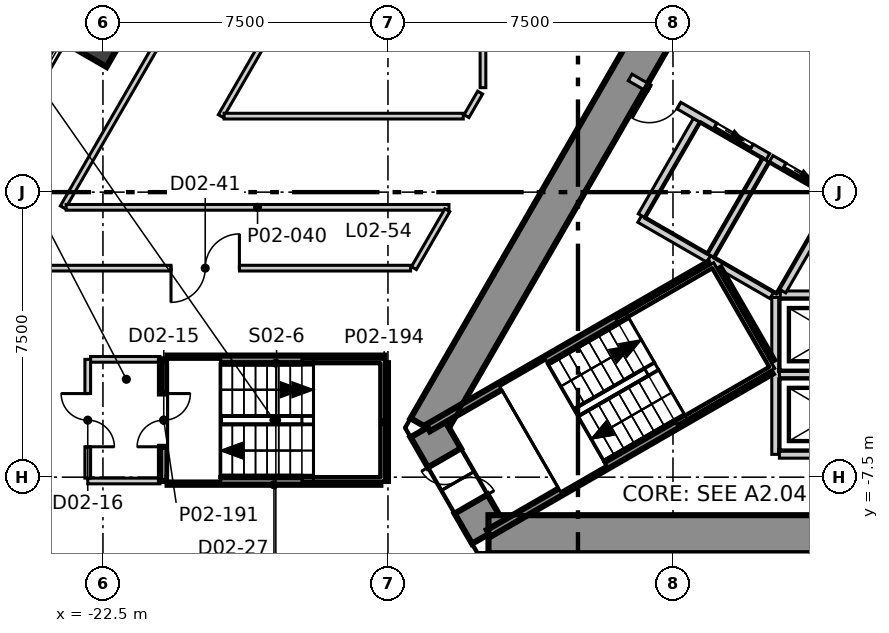
"""IFC4 building model, lengths in metres.
Left out: names, types, materials, properties, quantities, classifications, styles, units other than length and angle.
Written with IfcOpenShell. Run it as: python <this file> out.ifc"""

import sys

from ifc_helpers import new_model, si_unit, direction, frame, frame_2d, origin, origin_2d, place, context, subcontext, project, spatial, polyline, rectangle, outline, extrude, element, fill, save


model = new_model("IFC4")
c1 = context("Model", 3, precision=1e-05, world=origin(), true_north=direction((0.0, 1.0)))
c2 = subcontext(c1, "Body", "Model", "MODEL_VIEW")
j1 = project(units=[si_unit("LENGTHUNIT", "METRE"), si_unit("PLANEANGLEUNIT", "RADIAN")], contexts=[c1])
p1 = place(None, origin())
s1 = spatial("IfcSite", under=j1, at=p1, CompositionType="ELEMENT")
p2 = place(p1, origin())
s2 = spatial("IfcBuilding", under=s1, at=p2, CompositionType="ELEMENT")
p3 = place(p2, frame((0.0, 0.0, 14.5)))
s3 = spatial("IfcBuildingStorey", under=s2, at=p3, CompositionType="ELEMENT", Elevation=14.5)
p4 = place(p3, frame((-1.617, 15.2, -0.4), z_axis=(0.0, 0.0, 1.0), x_axis=(-0.499992141631, -0.866029940768, 0.0)))
e1 = element("IfcWall", 1, at=p4, inside=s3, PredefinedType="SHEAR", context=c2, shape_type="SweptSolid", body=[
    extrude(outline(polyline([(-0.289, -0.499), (1.656, -0.499), (3.601, -0.499), (5.547, -0.499), (7.492, -0.499), (9.437, -0.5), (11.382, -0.5), (13.328, -0.5), (15.273, -0.5), (17.218, -0.5), (19.163, -0.5), (21.109, -0.5), (23.054, -0.5), (24.999, -0.5), (24.422, 0.5), (22.566, 0.5), (20.709, 0.5), (18.853, 0.5), (16.997, 0.5), (15.14, 0.5), (13.284, 0.5), (11.427, 0.5), (9.571, 0.5), (7.715, 0.5), (5.858, 0.5), (4.002, 0.5), (2.146, 0.5), (0.289, 0.5), (-0.289, -0.499)])), origin(), (0.0, 0.0, 1.0), 5.4),
])
p5 = place(p4, frame((11.805, 0.0, 0.4)))
e2 = element("IfcOpeningElement", 2, at=p5, cuts=e1, PredefinedType="OPENING", context=c2, shape_type="SweptSolid", body=[
    extrude(rectangle(XDim=1.1, YDim=2.1, at=frame_2d((0.55, 1.05))), frame((0.0, 0.51, 0.0), z_axis=(0.0, -1.0, 0.0), x_axis=(1.0, 0.0, 0.0)), (0.0, 0.0, 1.0), 1.02),
])
p6 = place(p3, frame((-13.972, -6.2, -0.4), z_axis=(0.0, 0.0, 1.0), x_axis=(0.500077567175, -0.865980615723, 0.0)))
e3 = element("IfcWall", 3, at=p6, inside=s3, PredefinedType="SHEAR", context=c2, shape_type="SweptSolid", body=[
    extrude(outline(polyline([(-0.289, -0.5), (1.616, -0.5), (3.522, -0.5), (2.944, 0.499), (1.617, 0.5), (0.289, 0.5), (-0.289, -0.5)])), origin(), (0.0, 0.0, 1.0), 5.4),
])
p7 = place(p6, frame((0.917, 0.0, 0.4)))
e4 = element("IfcOpeningElement", 4, at=p7, cuts=e3, PredefinedType="OPENING", context=c2, shape_type="SweptSolid", body=[
    extrude(rectangle(XDim=1.4, YDim=2.1, at=frame_2d((0.7, 1.05))), frame((0.0, 0.51, 0.0), z_axis=(0.0, -1.0, 0.0), x_axis=(1.0, 0.0, 0.0)), (0.0, 0.0, 1.0), 1.02),
])
p8 = place(p3, frame((-12.355, -9.0, -0.4), z_axis=(0.0, 0.0, 1.0), x_axis=(1.0, 0.0, 0.0)))
e5 = element("IfcWall", 5, at=p8, inside=s3, PredefinedType="SHEAR", context=c2, shape_type="SweptSolid", body=[
    extrude(outline(polyline([(-0.289, -0.5), (1.656, -0.5), (3.601, -0.5), (5.547, -0.5), (7.492, -0.5), (9.437, -0.5), (11.382, -0.5), (13.328, -0.5), (15.273, -0.5), (17.218, -0.5), (19.163, -0.5), (21.109, -0.5), (23.054, -0.5), (24.999, -0.5), (24.422, 0.5), (22.566, 0.5), (20.709, 0.5), (18.853, 0.5), (16.996, 0.5), (15.14, 0.5), (13.283, 0.5), (11.427, 0.5), (9.57, 0.5), (7.714, 0.5), (5.857, 0.5), (4.001, 0.5), (2.145, 0.5), (0.288, 0.5), (-0.289, -0.5)])), origin(), (0.0, 0.0, 1.0), 5.4),
])
p9 = place(p3, frame((-22.506, 4.219, -0.4), z_axis=(0.0, 0.0, 1.0), x_axis=(0.5, 0.866025403784, 0.0)))
e6 = element("IfcColumn", 6, at=p9, inside=s3, PredefinedType="COLUMN", context=c2, shape_type="SweptSolid", body=[
    extrude(rectangle(XDim=1.5, YDim=1.1, at=origin_2d()), origin(), (0.0, 0.0, 1.0), 5.4),
])
p10 = place(p3, frame((-22.9, -7.6, 0.0), z_axis=(0.0, 0.0, 1.0), x_axis=(1.0, 0.0, 0.0)))
e7 = element("IfcWall", 7, at=p10, inside=s3, PredefinedType="PARTITIONING", context=c2, shape_type="SweptSolid", body=[
    extrude(rectangle(XDim=1.9, YDim=0.15, at=frame_2d((0.95, 0.0))), origin(), (0.0, 0.0, 1.0), 5.0),
])
p11 = place(p3, frame((-22.9, -7.525, 0.0), z_axis=(0.0, 0.0, 1.0), x_axis=(0.0, 1.0, 0.0)))
e8 = element("IfcWall", 8, at=p11, inside=s3, PredefinedType="PARTITIONING", context=c2, shape_type="SweptSolid", body=[
    extrude(rectangle(XDim=3.125, YDim=0.15, at=frame_2d((1.562, 0.0))), origin(), (0.0, 0.0, 1.0), 5.0),
])
p12 = place(p11, frame((0.825, 0.0, 0.0)))
e9 = element("IfcOpeningElement", 9, at=p12, cuts=e8, PredefinedType="OPENING", context=c2, shape_type="SweptSolid", body=[
    extrude(rectangle(XDim=1.4, YDim=2.1, at=frame_2d((0.7, 1.05))), frame((0.0, 0.085, 0.0), z_axis=(0.0, -1.0, 0.0), x_axis=(1.0, 0.0, 0.0)), (0.0, 0.0, 1.0), 0.17),
])
p13 = place(p3, frame((-22.825, -4.4, 0.0), z_axis=(0.0, 0.0, 1.0), x_axis=(1.0, 0.0, 0.0)))
e10 = element("IfcWall", 10, at=p13, inside=s3, PredefinedType="PARTITIONING", context=c2, shape_type="SweptSolid", body=[
    extrude(rectangle(XDim=1.825, YDim=0.15, at=frame_2d((0.913, 0.0))), origin(), (0.0, 0.0, 1.0), 5.0),
])
p14 = place(p3, frame((-23.556, -0.4, 0.0), z_axis=(0.0, 0.0, 1.0), x_axis=(0.500011000363, 0.866019052629, 0.0)))
e11 = element("IfcWall", 11, at=p14, inside=s3, PredefinedType="PARTITIONING", context=c2, shape_type="SweptSolid", body=[
    extrude(rectangle(XDim=17.089, YDim=0.15, at=frame_2d((8.545, 0.0))), origin(), (0.0, 0.0, 1.0), 5.0),
])
p15 = place(p3, frame((-23.469, -0.4, 0.0), z_axis=(0.0, 0.0, 1.0), x_axis=(1.0, 0.0, 0.0)))
e12 = element("IfcWall", 12, at=p15, inside=s3, PredefinedType="PARTITIONING", context=c2, shape_type="SweptSolid", body=[
    extrude(rectangle(XDim=10.074, YDim=0.15, at=frame_2d((5.037, 0.0))), origin(), (0.0, 0.0, 1.0), 5.0),
])
p16 = place(p3, frame((-14.318, -2.0, 0.0), z_axis=(0.0, 0.0, 1.0), x_axis=(0.499882500683, 0.86609323142, 0.0)))
e13 = element("IfcWall", 13, at=p16, inside=s3, PredefinedType="PARTITIONING", context=c2, shape_type="SweptSolid", body=[
    extrude(rectangle(XDim=1.761, YDim=0.15, at=frame_2d((0.88, 0.0))), origin(), (0.0, 0.0, 1.0), 5.0),
])
p17 = place(p3, frame((-25.225, -2.0, 0.0), z_axis=(0.0, 0.0, 1.0), x_axis=(1.0, 0.0, 0.0)))
e14 = element("IfcWall", 14, at=p17, inside=s3, PredefinedType="PARTITIONING", context=c2, shape_type="SweptSolid", body=[
    extrude(rectangle(XDim=10.82, YDim=0.15, at=frame_2d((5.41, 0.0))), origin(), (0.0, 0.0, 1.0), 4.4),
])
p18 = place(p17, frame((4.516, 0.0, 0.0)))
e15 = element("IfcOpeningElement", 15, at=p18, cuts=e14, PredefinedType="OPENING", context=c2, shape_type="SweptSolid", body=[
    extrude(rectangle(XDim=1.8, YDim=2.1, at=frame_2d((0.9, 1.05))), frame((0.0, 0.085, 0.0), z_axis=(0.0, -1.0, 0.0), x_axis=(1.0, 0.0, 0.0)), (0.0, 0.0, 1.0), 0.17),
])
p19 = place(p3, frame((-19.399, 2.0, 0.0), z_axis=(0.0, 0.0, 1.0), x_axis=(0.500027479704, 0.866009537788, 0.0)))
e16 = element("IfcWall", 16, at=p19, inside=s3, PredefinedType="PARTITIONING", context=c2, shape_type="SweptSolid", body=[
    extrude(rectangle(XDim=11.547, YDim=0.15, at=frame_2d((5.773, 0.0))), origin(), (0.0, 0.0, 1.0), 5.0),
])
p20 = place(p19, frame((4.874, 0.0, 0.0)))
e17 = element("IfcOpeningElement", 17, at=p20, cuts=e16, PredefinedType="OPENING", context=c2, shape_type="SweptSolid", body=[
    extrude(rectangle(XDim=1.8, YDim=2.1, at=frame_2d((0.9, 1.05))), frame((0.0, 0.085, 0.0), z_axis=(0.0, -1.0, 0.0), x_axis=(1.0, 0.0, 0.0)), (0.0, 0.0, 1.0), 0.17),
])
p21 = place(p3, frame((-12.5, 2.749, 0.0), z_axis=(0.0, 0.0, 1.0), x_axis=(0.0, 1.0, 0.0)))
e18 = element("IfcWall", 18, at=p21, inside=s3, PredefinedType="PARTITIONING", context=c2, shape_type="SweptSolid", body=[
    extrude(rectangle(XDim=9.176, YDim=0.15, at=frame_2d((4.588, 0.0))), origin(), (0.0, 0.0, 1.0), 5.0),
])
p22 = place(p3, frame((-12.933, 2.0, 0.0), z_axis=(0.0, 0.0, 1.0), x_axis=(0.500874756494, 0.865519773493, 0.0)))
e19 = element("IfcWall", 19, at=p22, inside=s3, PredefinedType="PARTITIONING", context=c2, shape_type="SweptSolid", body=[
    extrude(rectangle(XDim=0.715, YDim=0.15, at=frame_2d((0.357, 0.0))), origin(), (0.0, 0.0, 1.0), 5.0),
])
p23 = place(p3, frame((-19.312, 2.0, 0.0), z_axis=(0.0, 0.0, 1.0), x_axis=(1.0, 0.0, 0.0)))
e20 = element("IfcWall", 20, at=p23, inside=s3, PredefinedType="PARTITIONING", context=c2, shape_type="SweptSolid", body=[
    extrude(rectangle(XDim=6.293, YDim=0.15, at=frame_2d((3.146, 0.0))), origin(), (0.0, 0.0, 1.0), 4.45),
])
p24 = place(p3, frame((-8.376, -0.707, 0.0), z_axis=(0.0, 0.0, 1.0), x_axis=(0.866067520717, -0.499927044236, 0.0)))
e21 = element("IfcWall", 21, at=p24, inside=s3, PredefinedType="SOLIDWALL", context=c2, shape_type="SweptSolid", body=[
    extrude(rectangle(XDim=2.1, YDim=0.2, at=frame_2d((1.05, 0.0))), origin(), (0.0, 0.0, 1.0), 5.0),
])
p25 = place(p3, frame((-8.326, -0.62, 0.0), z_axis=(0.0, 0.0, 1.0), x_axis=(0.500023687443, 0.866011727401, 0.0)))
e22 = element("IfcWall", 22, at=p25, inside=s3, PredefinedType="SOLIDWALL", context=c2, shape_type="SweptSolid", body=[
    extrude(rectangle(XDim=2.9, YDim=0.2, at=frame_2d((1.45, 0.0))), origin(), (0.0, 0.0, 1.0), 5.0),
])
p26 = place(p3, frame((-4.7, -4.8, 0.0), z_axis=(0.0, 0.0, 1.0), x_axis=(1.0, 0.0, 0.0)))
e23 = element("IfcWall", 23, at=p26, inside=s3, PredefinedType="SOLIDWALL", context=c2, shape_type="SweptSolid", body=[
    extrude(rectangle(XDim=2.9, YDim=0.2, at=frame_2d((1.45, 0.0))), origin(), (0.0, 0.0, 1.0), 5.0),
])
p27 = place(p3, frame((-4.8, -6.9, 0.0), z_axis=(0.0, 0.0, 1.0), x_axis=(0.0, 1.0, 0.0)))
e24 = element("IfcWall", 24, at=p27, inside=s3, PredefinedType="SOLIDWALL", context=c2, shape_type="SweptSolid", body=[
    extrude(rectangle(XDim=4.131, YDim=0.2, at=frame_2d((2.065, 0.0))), origin(), (0.0, 0.0, 1.0), 5.0),
])
p28 = place(p3, frame((-4.7, -6.9, 0.0), z_axis=(0.0, 0.0, 1.0), x_axis=(1.0, 0.0, 0.0)))
e25 = element("IfcWall", 25, at=p28, inside=s3, PredefinedType="SOLIDWALL", context=c2, shape_type="SweptSolid", body=[
    extrude(rectangle(XDim=2.9, YDim=0.2, at=frame_2d((1.45, 0.0))), origin(), (0.0, 0.0, 1.0), 5.0),
])
p29 = place(p3, frame((-4.676, -2.7, 0.0), z_axis=(0.0, 0.0, 1.0), x_axis=(1.0, 0.0, 0.0)))
e26 = element("IfcWall", 26, at=p29, inside=s3, PredefinedType="SOLIDWALL", context=c2, shape_type="SweptSolid", body=[
    extrude(rectangle(XDim=2.873, YDim=0.2, at=frame_2d((1.437, 0.0))), origin(), (0.0, 0.0, 1.0), 5.0),
])
p30 = place(p29, frame((0.937, 0.0, 0.0)))
e27 = element("IfcOpeningElement", 27, at=p30, cuts=e26, PredefinedType="OPENING", context=c2, shape_type="SweptSolid", body=[
    extrude(rectangle(XDim=1.1, YDim=2.1, at=frame_2d((0.55, 1.05))), frame((0.0, 0.11, 0.0), z_axis=(0.0, -1.0, 0.0), x_axis=(1.0, 0.0, 0.0)), (0.0, 0.0, 1.0), 0.22),
])
p31 = place(p3, frame((-8.627, 3.018, 0.0), z_axis=(0.0, 0.0, 1.0), x_axis=(0.866039775641, -0.499975106388, 0.0)))
e28 = element("IfcWall", 28, at=p31, inside=s3, PredefinedType="SOLIDWALL", context=c2, shape_type="SweptSolid", body=[
    extrude(rectangle(XDim=4.182, YDim=0.2, at=frame_2d((2.091, 0.0))), origin(), (0.0, 0.0, 1.0), 5.0),
])
p32 = place(p31, frame((2.58, 0.0, 0.0)))
e29 = element("IfcOpeningElement", 29, at=p32, cuts=e28, PredefinedType="OPENING", context=c2, shape_type="SweptSolid", body=[
    extrude(rectangle(XDim=1.1, YDim=2.1, at=frame_2d((0.55, 1.05))), frame((0.0, 0.11, 0.0), z_axis=(0.0, -1.0, 0.0), x_axis=(1.0, 0.0, 0.0)), (0.0, 0.0, 1.0), 0.22),
])
p33 = place(p31, frame((0.58, 0.0, 0.0)))
e30 = element("IfcOpeningElement", 30, at=p33, cuts=e28, PredefinedType="OPENING", context=c2, shape_type="SweptSolid", body=[
    extrude(rectangle(XDim=0.9, YDim=2.1, at=frame_2d((0.45, 1.05))), frame((0.0, 0.11, 0.0), z_axis=(0.0, -1.0, 0.0), x_axis=(1.0, 0.0, 0.0)), (0.0, 0.0, 1.0), 0.22),
])
p34 = place(p3, frame((-6.557, -1.757, 0.0), z_axis=(0.0, 0.0, 1.0), x_axis=(0.8659754619, -0.500086491905, 0.0)))
e31 = element("IfcWall", 31, at=p34, inside=s3, PredefinedType="SOLIDWALL", context=c2, shape_type="SweptSolid", body=[
    extrude(rectangle(XDim=1.916, YDim=0.2, at=frame_2d((0.958, 0.0))), origin(), (0.0, 0.0, 1.0), 5.0),
])
p35 = place(p3, frame((-6.507, -1.67, 0.0), z_axis=(0.0, 0.0, 1.0), x_axis=(0.50012328804, 0.865954211699, 0.0)))
e32 = element("IfcWall", 32, at=p35, inside=s3, PredefinedType="SOLIDWALL", context=c2, shape_type="SweptSolid", body=[
    extrude(rectangle(XDim=2.9, YDim=0.2, at=frame_2d((1.45, 0.0))), origin(), (0.0, 0.0, 1.0), 5.0),
])
p36 = place(p3, frame((-4.92, 0.878, 0.0), z_axis=(0.0, 0.0, 1.0), x_axis=(0.866010750942, -0.50002537861, 0.0)))
e33 = element("IfcWall", 33, at=p36, inside=s3, PredefinedType="SOLIDWALL", context=c2, shape_type="SweptSolid", body=[
    extrude(rectangle(XDim=2.0, YDim=0.2, at=frame_2d((1.0, 0.0))), origin(), (0.0, 0.0, 1.0), 5.0),
])
p37 = place(p36, frame((0.4, 0.0, 0.0)))
e34 = element("IfcOpeningElement", 34, at=p37, cuts=e33, PredefinedType="OPENING", context=c2, shape_type="SweptSolid", body=[
    extrude(rectangle(XDim=1.1, YDim=2.1, at=frame_2d((0.55, 1.05))), frame((0.0, 0.11, 0.0), z_axis=(0.0, -1.0, 0.0), x_axis=(1.0, 0.0, 0.0)), (0.0, 0.0, 1.0), 0.22),
])
p38 = place(p3, frame((-4.619, -2.6, 0.0), z_axis=(0.0, 0.0, 1.0), x_axis=(0.50009492287, 0.865970593103, 0.0)))
e35 = element("IfcWall", 35, at=p38, inside=s3, PredefinedType="SOLIDWALL", context=c2, shape_type="SweptSolid", body=[
    extrude(rectangle(XDim=2.761, YDim=0.2, at=frame_2d((1.381, 0.0))), origin(), (0.0, 0.0, 1.0), 5.0),
])
p39 = place(p3, frame((-13.946, -6.204, 0.0), z_axis=(0.0, 0.0, 1.0), x_axis=(0.866036527536, 0.499980732602, 0.0)))
e36 = element("IfcWall", 36, at=p39, inside=s3, PredefinedType="SOLIDWALL", context=c2, shape_type="SweptSolid", body=[
    extrude(rectangle(XDim=8.564, YDim=0.2, at=frame_2d((4.282, 0.0))), origin(), (0.0, 0.0, 1.0), 5.0),
])
p40 = place(p3, frame((-6.329, -2.038, 0.0), z_axis=(0.0, 0.0, 1.0), x_axis=(0.500200581029, -0.865909567298, 0.0)))
e37 = element("IfcWall", 37, at=p40, inside=s3, PredefinedType="SOLIDWALL", context=c2, shape_type="SweptSolid", body=[
    extrude(rectangle(XDim=2.799, YDim=0.2, at=frame_2d((1.399, 0.0))), origin(), (0.0, 0.0, 1.0), 5.0),
])
p41 = place(p3, frame((-12.346, -8.976, 0.0), z_axis=(0.0, 0.0, 1.0), x_axis=(0.865987152174, 0.50006624788, 0.0)))
e38 = element("IfcWall", 38, at=p41, inside=s3, PredefinedType="SOLIDWALL", context=c2, shape_type="SweptSolid", body=[
    extrude(rectangle(XDim=8.565, YDim=0.2, at=frame_2d((4.282, 0.0))), origin(), (0.0, 0.0, 1.0), 5.0),
])
p42 = place(p3, frame((-20.9, -7.6, 0.0), z_axis=(0.0, 0.0, 1.0), x_axis=(0.0, 1.0, 0.0)))
e39 = element("IfcWall", 39, at=p42, inside=s3, PredefinedType="SOLIDWALL", context=c2, shape_type="SweptSolid", body=[
    extrude(rectangle(XDim=3.2, YDim=0.2, at=frame_2d((1.6, 0.0))), origin(), (0.0, 0.0, 1.0), 5.0),
])
p43 = place(p42, frame((0.9, 0.0, 0.0)))
e40 = element("IfcOpeningElement", 40, at=p43, cuts=e39, PredefinedType="OPENING", context=c2, shape_type="SweptSolid", body=[
    extrude(rectangle(XDim=1.4, YDim=2.1, at=frame_2d((0.7, 1.05))), frame((0.0, 0.11, 0.0), z_axis=(0.0, -1.0, 0.0), x_axis=(1.0, 0.0, 0.0)), (0.0, 0.0, 1.0), 0.22),
])
p44 = place(p3, frame((-20.8, -4.4, 0.0), z_axis=(0.0, 0.0, 1.0), x_axis=(1.0, 0.0, 0.0)))
e41 = element("IfcWall", 41, at=p44, inside=s3, PredefinedType="SOLIDWALL", context=c2, shape_type="SweptSolid", body=[
    extrude(rectangle(XDim=5.7, YDim=0.2, at=frame_2d((2.85, 0.0))), origin(), (0.0, 0.0, 1.0), 5.0),
])
p45 = place(p3, frame((-15.1, -7.6, 0.0), z_axis=(0.0, 0.0, 1.0), x_axis=(0.0, 1.0, 0.0)))
e42 = element("IfcWall", 42, at=p45, inside=s3, PredefinedType="SOLIDWALL", context=c2, shape_type="SweptSolid", body=[
    extrude(rectangle(XDim=3.1, YDim=0.2, at=frame_2d((1.55, 0.0))), origin(), (0.0, 0.0, 1.0), 5.0),
])
p46 = place(p3, frame((-20.8, -7.6, 0.0), z_axis=(0.0, 0.0, 1.0), x_axis=(1.0, 0.0, 0.0)))
e43 = element("IfcWall", 43, at=p46, inside=s3, PredefinedType="SOLIDWALL", context=c2, shape_type="SweptSolid", body=[
    extrude(rectangle(XDim=5.6, YDim=0.2, at=frame_2d((2.8, 0.0))), origin(), (0.0, 0.0, 1.0), 5.0),
])
p47 = place(p37, origin())
e44 = element("IfcDoor", 44, at=p47, inside=s3, OperationType="SLIDING_TO_LEFT", PredefinedType="DOOR", context=c2, shape_type="SweptSolid", body=[
    extrude(rectangle(XDim=1.1, YDim=2.1, at=frame_2d((0.55, 1.05))), frame((0.0, 0.025, 0.0), z_axis=(0.0, -1.0, 0.0), x_axis=(1.0, 0.0, 0.0)), (0.0, 0.0, 1.0), 0.05),
])
fill(e34, e44)
p48 = place(p32, origin())
e45 = element("IfcDoor", 45, at=p48, inside=s3, OperationType="SLIDING_TO_LEFT", PredefinedType="DOOR", context=c2, shape_type="SweptSolid", body=[
    extrude(rectangle(XDim=1.1, YDim=2.1, at=frame_2d((0.55, 1.05))), frame((0.0, 0.025, 0.0), z_axis=(0.0, -1.0, 0.0), x_axis=(1.0, 0.0, 0.0)), (0.0, 0.0, 1.0), 0.05),
])
fill(e29, e45)
p49 = place(p43, origin())
e46 = element("IfcDoor", 46, at=p49, inside=s3, OperationType="DOUBLE_DOOR_SINGLE_SWING", PredefinedType="DOOR", context=c2, shape_type="SweptSolid", body=[
    extrude(rectangle(XDim=1.4, YDim=2.1, at=frame_2d((0.7, 1.05))), frame((0.0, 0.025, 0.0), z_axis=(0.0, -1.0, 0.0), x_axis=(1.0, 0.0, 0.0)), (0.0, 0.0, 1.0), 0.05),
])
fill(e40, e46)
p50 = place(p12, origin())
e47 = element("IfcDoor", 47, at=p50, inside=s3, OperationType="DOUBLE_DOOR_SINGLE_SWING", PredefinedType="DOOR", context=c2, shape_type="SweptSolid", body=[
    extrude(rectangle(XDim=1.4, YDim=2.1, at=frame_2d((0.7, 1.05))), frame((0.0, 0.025, 0.0), z_axis=(0.0, -1.0, 0.0), x_axis=(1.0, 0.0, 0.0)), (0.0, 0.0, 1.0), 0.05),
])
fill(e9, e47)
p51 = place(p18, origin())
e48 = element("IfcDoor", 48, at=p51, inside=s3, OperationType="DOUBLE_DOOR_SINGLE_SWING", PredefinedType="DOOR", context=c2, shape_type="SweptSolid", body=[
    extrude(rectangle(XDim=1.8, YDim=2.1, at=frame_2d((0.9, 1.05))), frame((0.0, 0.025, 0.0), z_axis=(0.0, -1.0, 0.0), x_axis=(1.0, 0.0, 0.0)), (0.0, 0.0, 1.0), 0.05),
])
fill(e15, e48)
p52 = place(p7, origin())
e49 = element("IfcDoor", 49, at=p52, inside=s3, OperationType="DOUBLE_DOOR_SINGLE_SWING", PredefinedType="DOOR", context=c2, shape_type="SweptSolid", body=[
    extrude(rectangle(XDim=1.4, YDim=2.1, at=frame_2d((0.7, 1.05))), frame((0.0, 0.025, 0.0), z_axis=(0.0, -1.0, 0.0), x_axis=(1.0, 0.0, 0.0)), (0.0, 0.0, 1.0), 0.05),
])
fill(e4, e49)
p53 = place(p33, origin())
e50 = element("IfcDoor", 50, at=p53, inside=s3, OperationType="SINGLE_SWING_LEFT", PredefinedType="DOOR", context=c2, shape_type="SweptSolid", body=[
    extrude(rectangle(XDim=0.9, YDim=2.1, at=frame_2d((0.45, 1.05))), frame((0.0, 0.025, 0.0), z_axis=(0.0, -1.0, 0.0), x_axis=(1.0, 0.0, 0.0)), (0.0, 0.0, 1.0), 0.05),
])
fill(e30, e50)
save(model, sys.argv[1])
